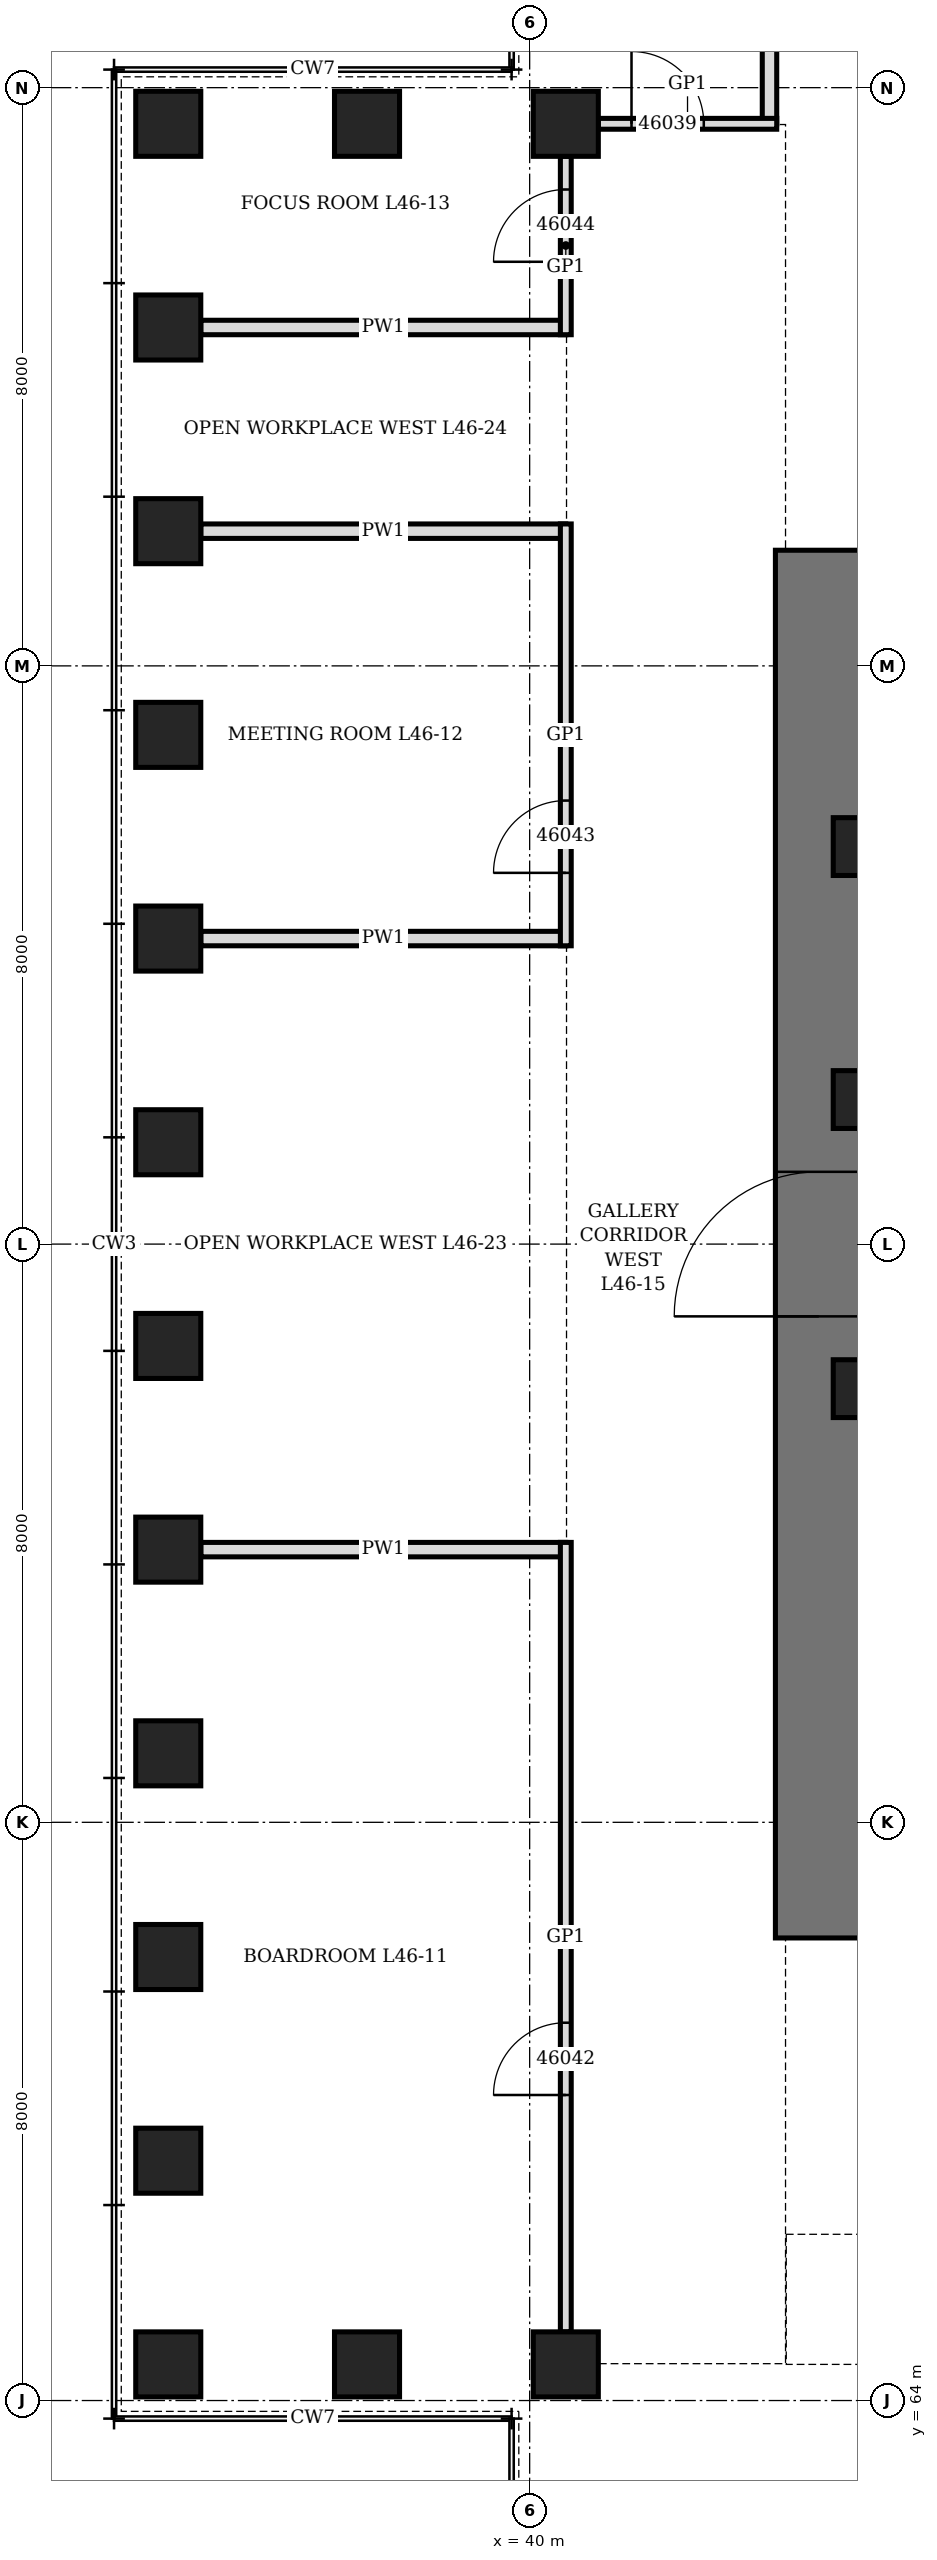
"""IFC4 building model, lengths in metres.
Left out: names, types, materials, properties, quantities, classifications, styles, units other than length and angle.
Written with IfcOpenShell. Run it as: python <this file> out.ifc"""

import sys

from ifc_helpers import new_model, si_unit, direction, frame, frame_2d, origin, origin_2d, place, context, subcontext, project, spatial, rectangle, hollow_rectangle, extrude, element, fill, save


model = new_model("IFC4")
c1 = context("Model", 3, precision=1e-05, world=origin(), true_north=direction((0.0, 1.0)))
c2 = subcontext(c1, "Body", "Model", "MODEL_VIEW")
j1 = project(units=[si_unit("LENGTHUNIT", "METRE"), si_unit("PLANEANGLEUNIT", "RADIAN")], contexts=[c1])
p1 = place(None, origin())
s1 = spatial("IfcSite", under=j1, at=p1, CompositionType="ELEMENT")
p2 = place(p1, origin())
s2 = spatial("IfcBuilding", under=s1, at=p2, CompositionType="ELEMENT")
p3 = place(p2, frame((0.0, 0.0, 206.5)))
s3 = spatial("IfcBuildingStorey", under=s2, at=p3, CompositionType="ELEMENT", Elevation=206.5)
for number, where, z_axis, x_axis in (
    (1, (40.5, 95.5, 0.0), (0.0, 0.0, 1.0), (1.0, 0.0, 0.0)),
    (2, (37.75, 95.5, 0.0), (0.0, 0.0, 1.0), (1.0, 0.0, 0.0)),
    (3, (35.0, 95.5, 0.0), (0.0, 0.0, 1.0), (0.0, 1.0, 0.0)),
    (4, (35.0, 92.682, 0.0), (0.0, 0.0, 1.0), (0.0, 1.0, 0.0)),
    (5, (35.0, 89.864, 0.0), (0.0, 0.0, 1.0), (0.0, 1.0, 0.0)),
    (6, (35.0, 87.045, 0.0), (0.0, 0.0, 1.0), (0.0, 1.0, 0.0)),
    (7, (35.0, 84.227, 0.0), (0.0, 0.0, 1.0), (0.0, 1.0, 0.0)),
    (8, (35.0, 81.409, 0.0), (0.0, 0.0, 1.0), (0.0, 1.0, 0.0)),
    (9, (35.0, 78.591, 0.0), (0.0, 0.0, 1.0), (0.0, 1.0, 0.0)),
    (10, (35.0, 75.773, 0.0), (0.0, 0.0, 1.0), (0.0, 1.0, 0.0)),
    (11, (35.0, 72.955, 0.0), (0.0, 0.0, 1.0), (0.0, 1.0, 0.0)),
    (12, (35.0, 70.136, 0.0), (0.0, 0.0, 1.0), (0.0, 1.0, 0.0)),
    (13, (35.0, 67.318, 0.0), (0.0, 0.0, 1.0), (0.0, 1.0, 0.0)),
    (14, (35.0, 64.5, 0.0), (0.0, 0.0, 1.0), (1.0, 0.0, 0.0)),
    (15, (37.75, 64.5, 0.0), (0.0, 0.0, 1.0), (1.0, 0.0, 0.0)),
    (16, (40.5, 64.5, 0.0), (0.0, 0.0, 1.0), (0.0, 1.0, 0.0)),
):
    element("IfcColumn", number, at=place(p3, frame(where, z_axis=z_axis, x_axis=x_axis)), inside=s3, PredefinedType="COLUMN", context=c2, shape_type="SweptSolid", body=[
        extrude(hollow_rectangle(XDim=0.9, YDim=0.9, WallThickness=0.12, at=origin_2d()), origin(), (0.0, 0.0, 1.0), 4.2),
    ])
p4 = place(p3, frame((44.0, 70.4, 0.0), z_axis=(0.0, 0.0, 1.0), x_axis=(0.0, 1.0, 0.0)))
e17 = element("IfcWall", 17, at=p4, inside=s3, PredefinedType="SHEAR", context=c2, shape_type="SweptSolid", body=[
    extrude(rectangle(XDim=19.2, YDim=1.2, at=frame_2d((9.6, 0.0))), origin(), (0.0, 0.0, 1.0), 4.2),
])
p5 = place(p4, frame((8.6, 0.0, 0.0)))
e18 = element("IfcOpeningElement", 18, at=p5, cuts=e17, PredefinedType="OPENING", context=c2, shape_type="SweptSolid", body=[
    extrude(rectangle(XDim=2.0, YDim=2.4, at=frame_2d((1.0, 1.2))), frame((0.0, 0.61, 0.0), z_axis=(0.0, -1.0, 0.0), x_axis=(1.0, 0.0, 0.0)), (0.0, 0.0, 1.0), 1.22),
])
for number, where, z_axis, x_axis in (
    (19, (44.6, 78.0, 0.0), (0.0, 0.0, 1.0), (1.0, 0.0, 0.0)),
    (20, (44.6, 82.0, 0.0), (0.0, 0.0, 1.0), (1.0, 0.0, 0.0)),
    (21, (44.6, 85.5, 0.0), (0.0, 0.0, 1.0), (1.0, 0.0, 0.0)),
):
    element("IfcColumn", number, at=place(p3, frame(where, z_axis=z_axis, x_axis=x_axis)), inside=s3, PredefinedType="COLUMN", context=c2, shape_type="SweptSolid", body=[
        extrude(hollow_rectangle(XDim=0.8, YDim=0.8, WallThickness=0.1, at=origin_2d()), origin(), (0.0, 0.0, 1.0), 4.2),
    ])
for number, where, z_axis, x_axis in (
    (22, (43.318, 95.5, 0.0), (0.0, 0.0, 1.0), (0.0, 1.0, 0.0)),
    (23, (35.45, 75.773, 0.0), (0.0, 0.0, 1.0), (1.0, 0.0, 0.0)),
    (24, (35.45, 84.227, 0.0), (0.0, 0.0, 1.0), (1.0, 0.0, 0.0)),
    (25, (35.45, 89.864, 0.0), (0.0, 0.0, 1.0), (1.0, 0.0, 0.0)),
    (26, (35.45, 92.682, 0.0), (0.0, 0.0, 1.0), (1.0, 0.0, 0.0)),
):
    element("IfcWall", number, at=place(p3, frame(where, z_axis=z_axis, x_axis=x_axis)), inside=s3, PredefinedType="PARTITIONING", context=c2, shape_type="SweptSolid", body=[
        extrude(rectangle(XDim=5.05, YDim=0.2, at=frame_2d((2.525, 0.0))), origin(), (0.0, 0.0, 1.0), 3.428),
    ])
p6 = place(p3, frame((40.95, 95.5, 0.0), z_axis=(0.0, 0.0, 1.0), x_axis=(1.0, 0.0, 0.0)))
e27 = element("IfcWall", 27, at=p6, inside=s3, PredefinedType="PARTITIONING", context=c2, shape_type="SweptSolid", body=[
    extrude(rectangle(XDim=2.468, YDim=0.15, at=frame_2d((1.234, 0.0))), origin(), (0.0, 0.0, 1.0), 4.04),
])
p7 = place(p6, frame((0.459, 0.0, 0.0)))
e28 = element("IfcOpeningElement", 28, at=p7, cuts=e27, PredefinedType="OPENING", context=c2, shape_type="SweptSolid", body=[
    extrude(rectangle(XDim=1.0, YDim=2.4, at=frame_2d((0.5, 1.2))), frame((0.0, 0.085, 0.0), z_axis=(0.0, -1.0, 0.0), x_axis=(1.0, 0.0, 0.0)), (0.0, 0.0, 1.0), 0.17),
])
p8 = place(p3, frame((40.5, 64.95, 0.0), z_axis=(0.0, 0.0, 1.0), x_axis=(0.0, 1.0, 0.0)))
e29 = element("IfcWall", 29, at=p8, inside=s3, PredefinedType="PARTITIONING", context=c2, shape_type="SweptSolid", body=[
    extrude(rectangle(XDim=10.923, YDim=0.15, at=frame_2d((5.461, 0.0))), origin(), (0.0, 0.0, 1.0), 4.04),
])
p9 = place(p8, frame((3.277, 0.0, 0.0)))
e30 = element("IfcOpeningElement", 30, at=p9, cuts=e29, PredefinedType="OPENING", context=c2, shape_type="SweptSolid", body=[
    extrude(rectangle(XDim=1.0, YDim=2.4, at=frame_2d((0.5, 1.2))), frame((0.0, 0.085, 0.0), z_axis=(0.0, -1.0, 0.0), x_axis=(1.0, 0.0, 0.0)), (0.0, 0.0, 1.0), 0.17),
])
p10 = place(p3, frame((40.5, 84.127, 0.0), z_axis=(0.0, 0.0, 1.0), x_axis=(0.0, 1.0, 0.0)))
e31 = element("IfcWall", 31, at=p10, inside=s3, PredefinedType="PARTITIONING", context=c2, shape_type="SweptSolid", body=[
    extrude(rectangle(XDim=5.836, YDim=0.15, at=frame_2d((2.918, 0.0))), origin(), (0.0, 0.0, 1.0), 4.04),
])
p11 = place(p10, frame((1.009, 0.0, 0.0)))
e32 = element("IfcOpeningElement", 32, at=p11, cuts=e31, PredefinedType="OPENING", context=c2, shape_type="SweptSolid", body=[
    extrude(rectangle(XDim=1.0, YDim=2.4, at=frame_2d((0.5, 1.2))), frame((0.0, 0.085, 0.0), z_axis=(0.0, -1.0, 0.0), x_axis=(1.0, 0.0, 0.0)), (0.0, 0.0, 1.0), 0.17),
])
p12 = place(p3, frame((40.5, 92.582, 0.0), z_axis=(0.0, 0.0, 1.0), x_axis=(0.0, 1.0, 0.0)))
e33 = element("IfcWall", 33, at=p12, inside=s3, PredefinedType="PARTITIONING", context=c2, shape_type="SweptSolid", body=[
    extrude(rectangle(XDim=2.468, YDim=0.15, at=frame_2d((1.234, 0.0))), origin(), (0.0, 0.0, 1.0), 4.04),
])
p13 = place(p12, frame((1.009, 0.0, 0.0)))
e34 = element("IfcOpeningElement", 34, at=p13, cuts=e33, PredefinedType="OPENING", context=c2, shape_type="SweptSolid", body=[
    extrude(rectangle(XDim=1.0, YDim=2.4, at=frame_2d((0.5, 1.2))), frame((0.0, 0.085, 0.0), z_axis=(0.0, -1.0, 0.0), x_axis=(1.0, 0.0, 0.0)), (0.0, 0.0, 1.0), 0.17),
])
p14 = place(p5, origin())
e35 = element("IfcDoor", 35, at=p14, inside=s3, OperationType="DOUBLE_DOOR_SINGLE_SWING", PredefinedType="DOOR", context=c2, shape_type="SweptSolid", body=[
    extrude(rectangle(XDim=2.0, YDim=2.4, at=frame_2d((1.0, 1.2))), frame((0.0, 0.35, 0.0), z_axis=(0.0, -1.0, 0.0), x_axis=(1.0, 0.0, 0.0)), (0.0, 0.0, 1.0), 0.7),
])
fill(e18, e35)
p15 = place(p7, origin())
e36 = element("IfcDoor", 36, at=p15, inside=s3, OperationType="SINGLE_SWING_RIGHT", PredefinedType="DOOR", context=c2, shape_type="SweptSolid", body=[
    extrude(rectangle(XDim=1.0, YDim=2.4, at=frame_2d((0.5, 1.2))), frame((0.0, 0.075, 0.0), z_axis=(0.0, -1.0, 0.0), x_axis=(1.0, 0.0, 0.0)), (0.0, 0.0, 1.0), 0.149),
])
fill(e28, e36)
p16 = place(p9, origin())
e37 = element("IfcDoor", 37, at=p16, inside=s3, OperationType="SINGLE_SWING_RIGHT", PredefinedType="DOOR", context=c2, shape_type="SweptSolid", body=[
    extrude(rectangle(XDim=1.0, YDim=2.4, at=frame_2d((0.5, 1.2))), frame((0.0, 0.075, 0.0), z_axis=(0.0, -1.0, 0.0), x_axis=(1.0, 0.0, 0.0)), (0.0, 0.0, 1.0), 0.149),
])
fill(e30, e37)
p17 = place(p11, origin())
e38 = element("IfcDoor", 38, at=p17, inside=s3, OperationType="SINGLE_SWING_RIGHT", PredefinedType="DOOR", context=c2, shape_type="SweptSolid", body=[
    extrude(rectangle(XDim=1.0, YDim=2.4, at=frame_2d((0.5, 1.2))), frame((0.0, 0.075, 0.0), z_axis=(0.0, -1.0, 0.0), x_axis=(1.0, 0.0, 0.0)), (0.0, 0.0, 1.0), 0.149),
])
fill(e32, e38)
p18 = place(p13, origin())
e39 = element("IfcDoor", 39, at=p18, inside=s3, OperationType="SINGLE_SWING_RIGHT", PredefinedType="DOOR", context=c2, shape_type="SweptSolid", body=[
    extrude(rectangle(XDim=1.0, YDim=2.4, at=frame_2d((0.5, 1.2))), frame((0.0, 0.075, 0.0), z_axis=(0.0, -1.0, 0.0), x_axis=(1.0, 0.0, 0.0)), (0.0, 0.0, 1.0), 0.149),
])
fill(e34, e39)
save(model, sys.argv[1])
